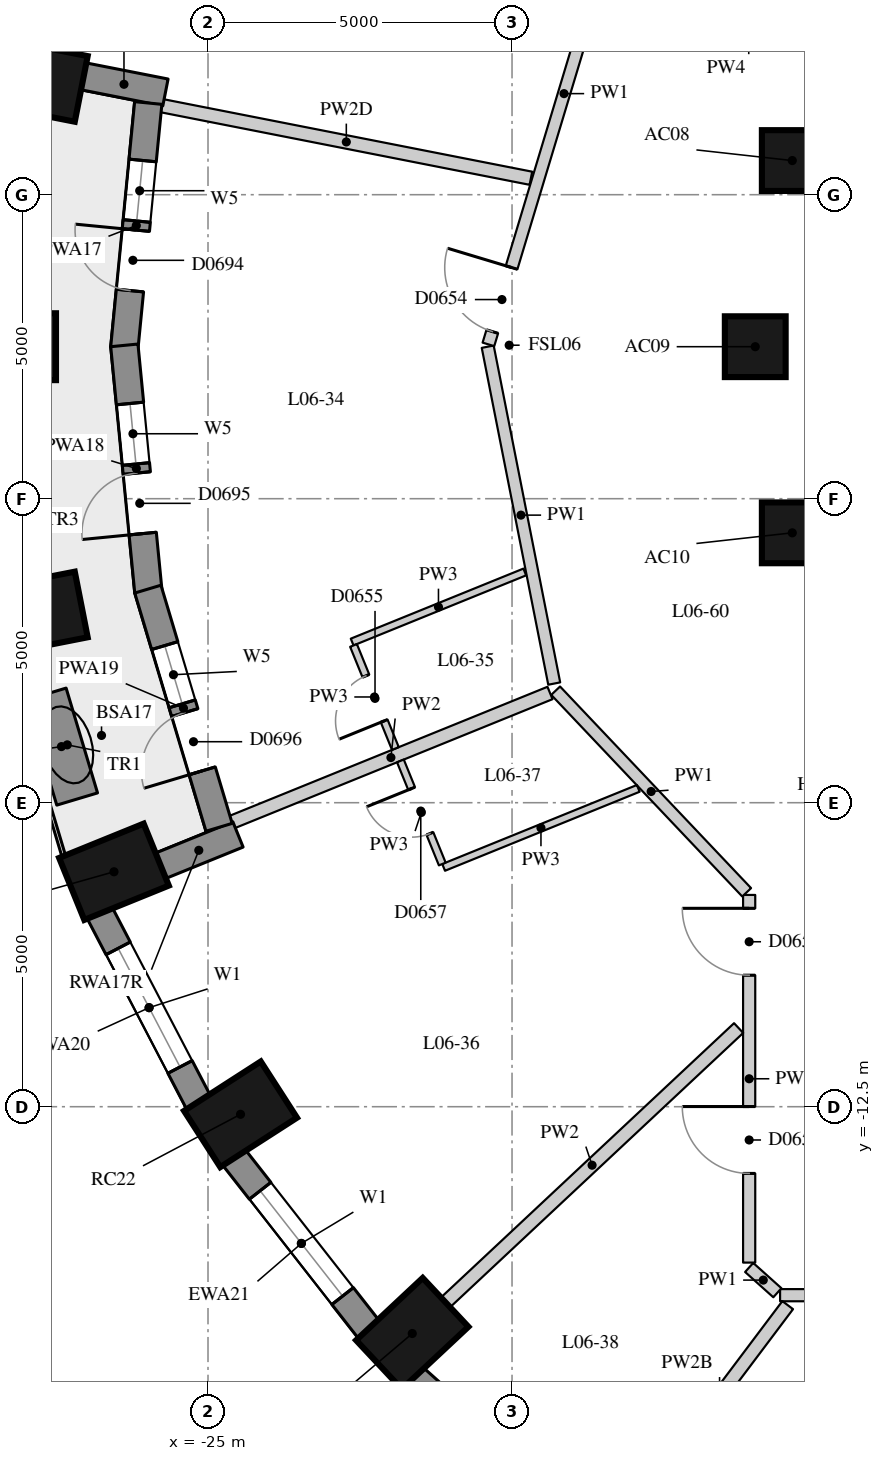
"""IFC4 building model, lengths in metres.
Left out: names, types, materials, properties, quantities, classifications, styles, units other than length and angle.
Written with IfcOpenShell. Run it as: python <this file> out.ifc"""

import sys

from ifc_helpers import new_model, si_unit, direction, frame, frame_2d, origin, origin_2d, place, context, subcontext, project, spatial, rectangle, extrude, element, fill, save


model = new_model("IFC4")
c1 = context("Model", 3, precision=1e-05, world=origin(), true_north=direction((0.0, 1.0)))
c2 = subcontext(c1, "Body", "Model", "MODEL_VIEW")
j1 = project(units=[si_unit("LENGTHUNIT", "METRE"), si_unit("PLANEANGLEUNIT", "RADIAN")], contexts=[c1])
p1 = place(None, origin())
s1 = spatial("IfcSite", under=j1, at=p1, CompositionType="ELEMENT")
p2 = place(p1, origin())
s2 = spatial("IfcBuilding", under=s1, at=p2, CompositionType="ELEMENT")
p3 = place(p2, frame((0.0, 0.0, 28.3)))
s3 = spatial("IfcBuildingStorey", under=s2, at=p3, CompositionType="ELEMENT", Elevation=28.3)
for number, where, z_axis, x_axis in (
    (1, (-27.821, 4.385, 0.0), (0.0, 0.0, 1.0), (-0.981, 0.193, 0.0)),
    (2, (-28.25, 0.0, 0.0), (0.0, 0.0, 1.0), (-1.0, 0.0, 0.0)),
    (3, (-27.821, -4.385, 0.0), (0.0, 0.0, 1.0), (-0.981, -0.193, 0.0)),
    (4, (-26.546, -8.636, 0.0), (0.0, 0.0, 1.0), (-0.927, -0.376, 0.0)),
    (5, (-24.465, -12.625, 0.0), (0.0, 0.0, 1.0), (-0.841, -0.541, 0.0)),
    (6, (-21.641, -16.23, 0.0), (0.0, 0.0, 1.0), (-0.73, -0.683, 0.0)),
):
    element("IfcColumn", number, at=place(p3, frame(where, z_axis=z_axis, x_axis=x_axis)), inside=s3, PredefinedType="COLUMN", context=c2, shape_type="SweptSolid", body=[
        extrude(rectangle(XDim=1.5, YDim=1.1, at=origin_2d()), origin(), (0.0, 0.0, 1.0), 3.3),
    ])
for number, where, z_axis, x_axis in (
    (7, (-15.391, 3.062, 0.0), (0.0, 0.0, 1.0), (1.0, 0.0, 0.0)),
    (8, (-16.0, 0.0, 0.0), (0.0, 0.0, 1.0), (1.0, 0.0, 0.0)),
    (9, (-15.391, -3.062, 0.0), (0.0, 0.0, 1.0), (1.0, 0.0, 0.0)),
):
    element("IfcColumn", number, at=place(p3, frame(where, z_axis=z_axis, x_axis=x_axis)), inside=s3, PredefinedType="COLUMN", context=c2, shape_type="SweptSolid", body=[
        extrude(rectangle(XDim=1.0, YDim=1.0, at=origin_2d()), origin(), (0.0, 0.0, 1.0), 3.3),
    ])
p4 = place(p3, frame((-26.786, -9.305, 0.0), z_axis=(0.0, 0.0, 1.0), x_axis=(0.462492775226, -0.886623050041, 0.0)))
e10 = element("IfcWall", 10, at=p4, inside=s3, PredefinedType="SOLIDWALL", context=c2, shape_type="SweptSolid", body=[
    extrude(rectangle(XDim=3.532, YDim=0.45, at=frame_2d((1.766, 0.0))), origin(), (0.0, 0.0, 1.0), 3.02),
])
p5 = place(p4, frame((0.666, 0.0, 0.4)))
e11 = element("IfcOpeningElement", 11, at=p5, cuts=e10, PredefinedType="OPENING", context=c2, shape_type="SweptSolid", body=[
    extrude(rectangle(XDim=2.2, YDim=1.75, at=frame_2d((1.1, 0.875))), frame((0.0, 0.235, 0.0), z_axis=(0.0, -1.0, 0.0), x_axis=(1.0, 0.0, 0.0)), (0.0, 0.0, 1.0), 0.47),
])
p6 = place(p3, frame((-24.578, -13.328, 0.0), z_axis=(0.0, 0.0, 1.0), x_axis=(0.616661975264, -0.787228053529, 0.0)))
e12 = element("IfcWall", 12, at=p6, inside=s3, PredefinedType="SOLIDWALL", context=c2, shape_type="SweptSolid", body=[
    extrude(rectangle(XDim=3.61, YDim=0.45, at=frame_2d((1.805, 0.0))), origin(), (0.0, 0.0, 1.0), 3.02),
])
p7 = place(p6, frame((0.705, 0.0, 0.4)))
e13 = element("IfcOpeningElement", 13, at=p7, cuts=e12, PredefinedType="OPENING", context=c2, shape_type="SweptSolid", body=[
    extrude(rectangle(XDim=2.2, YDim=1.75, at=frame_2d((1.1, 0.875))), frame((0.0, 0.235, 0.0), z_axis=(0.0, -1.0, 0.0), x_axis=(1.0, 0.0, 0.0)), (0.0, 0.0, 1.0), 0.47),
])
p8 = place(p3, frame((-21.627, -16.943, 0.0), z_axis=(0.0, 0.0, 1.0), x_axis=(0.745526233716, -0.66647628228, 0.0)))
e14 = element("IfcWall", 14, at=p8, inside=s3, PredefinedType="SOLIDWALL", context=c2, shape_type="SweptSolid", body=[
    extrude(rectangle(XDim=3.697, YDim=0.45, at=frame_2d((1.848, 0.0))), origin(), (0.0, 0.0, 1.0), 3.02),
])
p9 = place(p8, frame((0.749, 0.0, 0.4)))
e15 = element("IfcOpeningElement", 15, at=p9, cuts=e14, PredefinedType="OPENING", context=c2, shape_type="SweptSolid", body=[
    extrude(rectangle(XDim=2.2, YDim=1.75, at=frame_2d((1.1, 0.875))), frame((0.0, 0.235, 0.0), z_axis=(0.0, -1.0, 0.0), x_axis=(1.0, 0.0, 0.0)), (0.0, 0.0, 1.0), 0.47),
])
p10 = place(p3, frame((-27.064, 4.45, 0.0), z_axis=(0.0, 0.0, 1.0), x_axis=(0.98123042829, -0.192838913596, 0.0)))
e16 = element("IfcWall", 16, at=p10, inside=s3, PredefinedType="SOLIDWALL", context=c2, shape_type="SweptSolid", body=[
    extrude(rectangle(XDim=1.39, YDim=0.45, at=frame_2d((0.695, 0.0))), origin(), (0.0, 0.0, 1.0), 2.47),
])
p11 = place(p3, frame((-25.796, -8.544, 0.0), z_axis=(0.0, 0.0, 1.0), x_axis=(0.926575599743, 0.376108572039, 0.0)))
e17 = element("IfcWall", 17, at=p11, inside=s3, PredefinedType="SOLIDWALL", context=c2, shape_type="SweptSolid", body=[
    extrude(rectangle(XDim=1.39, YDim=0.45, at=frame_2d((0.695, 0.0))), origin(), (0.0, 0.0, 1.0), 3.02),
])
p12 = place(p3, frame((-25.983, 4.008, 0.0), z_axis=(0.0, 0.0, 1.0), x_axis=(-0.097133468736, -0.995271364629, 0.0)))
e18 = element("IfcWall", 18, at=p12, inside=s3, PredefinedType="SOLIDWALL", context=c2, shape_type="SweptSolid", body=[
    extrude(rectangle(XDim=4.049, YDim=0.45, at=frame_2d((2.024, 0.0))), origin(), (0.0, 0.0, 1.0), 3.02),
])
p13 = place(p12, frame((0.949, 0.0, 0.4)))
e19 = element("IfcOpeningElement", 19, at=p13, cuts=e18, PredefinedType="OPENING", context=c2, shape_type="SweptSolid", body=[
    extrude(rectangle(XDim=1.0, YDim=1.75, at=frame_2d((0.5, 0.875))), frame((0.0, 0.235, 0.0), z_axis=(0.0, -1.0, 0.0), x_axis=(1.0, 0.0, 0.0)), (0.0, 0.0, 1.0), 0.47),
])
p14 = place(p12, frame((2.1, 0.0, 0.0)))
e20 = element("IfcOpeningElement", 20, at=p14, cuts=e18, PredefinedType="OPENING", context=c2, shape_type="SweptSolid", body=[
    extrude(rectangle(XDim=1.0, YDim=2.15, at=frame_2d((0.5, 1.075))), frame((0.0, 0.235, 0.0), z_axis=(0.0, -1.0, 0.0), x_axis=(1.0, 0.0, 0.0)), (0.0, 0.0, 1.0), 0.47),
])
p15 = place(p3, frame((-26.376, 0.022, 0.0), z_axis=(0.0, 0.0, 1.0), x_axis=(0.097092719726, -0.995275340685, 0.0)))
e21 = element("IfcWall", 21, at=p15, inside=s3, PredefinedType="SOLIDWALL", context=c2, shape_type="SweptSolid", body=[
    extrude(rectangle(XDim=4.071, YDim=0.45, at=frame_2d((2.036, 0.0))), origin(), (0.0, 0.0, 1.0), 3.02),
])
p16 = place(p15, frame((0.96, 0.0, 0.4)))
e22 = element("IfcOpeningElement", 22, at=p16, cuts=e21, PredefinedType="OPENING", context=c2, shape_type="SweptSolid", body=[
    extrude(rectangle(XDim=1.0, YDim=1.75, at=frame_2d((0.5, 0.875))), frame((0.0, 0.235, 0.0), z_axis=(0.0, -1.0, 0.0), x_axis=(1.0, 0.0, 0.0)), (0.0, 0.0, 1.0), 0.47),
])
p17 = place(p15, frame((2.111, 0.0, 0.0)))
e23 = element("IfcOpeningElement", 23, at=p17, cuts=e21, PredefinedType="OPENING", context=c2, shape_type="SweptSolid", body=[
    extrude(rectangle(XDim=1.0, YDim=2.15, at=frame_2d((0.5, 1.075))), frame((0.0, 0.235, 0.0), z_axis=(0.0, -1.0, 0.0), x_axis=(1.0, 0.0, 0.0)), (0.0, 0.0, 1.0), 0.47),
])
p18 = place(p3, frame((-25.989, -3.987, 0.0), z_axis=(0.0, 0.0, 1.0), x_axis=(0.286427456555, -0.958101932015, 0.0)))
e24 = element("IfcWall", 24, at=p18, inside=s3, PredefinedType="SOLIDWALL", context=c2, shape_type="SweptSolid", body=[
    extrude(rectangle(XDim=4.089, YDim=0.45, at=frame_2d((2.044, 0.0))), origin(), (0.0, 0.0, 1.0), 3.02),
])
p19 = place(p18, frame((0.969, 0.0, 0.4)))
e25 = element("IfcOpeningElement", 25, at=p19, cuts=e24, PredefinedType="OPENING", context=c2, shape_type="SweptSolid", body=[
    extrude(rectangle(XDim=1.0, YDim=1.75, at=frame_2d((0.5, 0.875))), frame((0.0, 0.235, 0.0), z_axis=(0.0, -1.0, 0.0), x_axis=(1.0, 0.0, 0.0)), (0.0, 0.0, 1.0), 0.47),
])
p20 = place(p18, frame((2.119, 0.0, 0.0)))
e26 = element("IfcOpeningElement", 26, at=p20, cuts=e24, PredefinedType="OPENING", context=c2, shape_type="SweptSolid", body=[
    extrude(rectangle(XDim=1.0, YDim=2.15, at=frame_2d((0.5, 1.075))), frame((0.0, 0.235, 0.0), z_axis=(0.0, -1.0, 0.0), x_axis=(1.0, 0.0, 0.0)), (0.0, 0.0, 1.0), 0.47),
])
p21 = place(p3, frame((-27.669, -5.715, 0.0), z_axis=(0.0, 0.0, 1.0), x_axis=(0.287024312863, -0.957923297465, 0.0)))
e27 = element("IfcWall", 27, at=p21, inside=s3, PredefinedType="USERDEFINED", context=c2, shape_type="SweptSolid", body=[
    extrude(rectangle(XDim=1.8, YDim=0.7, at=frame_2d((0.9, 0.0))), origin(), (0.0, 0.0, 1.0), 0.75),
])
p22 = place(p3, frame((-7.92, -15.6, 0.0), z_axis=(0.0, 0.0, 1.0), x_axis=(-1.0, 0.0, 0.0)))
e28 = element("IfcWall", 28, at=p22, inside=s3, PredefinedType="PARTITIONING", context=c2, shape_type="SweptSolid", body=[
    extrude(rectangle(XDim=7.672, YDim=0.2, at=frame_2d((3.836, 0.0))), origin(), (0.0, 0.0, 1.0), 3.02),
])
p23 = place(p22, frame((5.537, 0.0, 0.0)))
e29 = element("IfcOpeningElement", 29, at=p23, cuts=e28, PredefinedType="OPENING", context=c2, shape_type="SweptSolid", body=[
    extrude(rectangle(XDim=1.0, YDim=2.1, at=frame_2d((0.5, 1.05))), frame((0.0, 0.11, 0.0), z_axis=(0.0, -1.0, 0.0), x_axis=(1.0, 0.0, 0.0)), (0.0, 0.0, 1.0), 0.22),
])
p24 = place(p22, frame((1.036, 0.0, 0.0)))
e30 = element("IfcOpeningElement", 30, at=p24, cuts=e28, PredefinedType="OPENING", context=c2, shape_type="SweptSolid", body=[
    extrude(rectangle(XDim=0.9, YDim=2.1, at=frame_2d((0.45, 1.05))), frame((0.0, 0.11, 0.0), z_axis=(0.0, -1.0, 0.0), x_axis=(1.0, 0.0, 0.0)), (0.0, 0.0, 1.0), 0.22),
])
p25 = place(p3, frame((-15.636, -15.56, 0.0), z_axis=(0.0, 0.0, 1.0), x_axis=(-0.744656758283, 0.667447610187, 0.0)))
e31 = element("IfcWall", 31, at=p25, inside=s3, PredefinedType="PARTITIONING", context=c2, shape_type="SweptSolid", body=[
    extrude(rectangle(XDim=0.623, YDim=0.2, at=frame_2d((0.312, 0.0))), origin(), (0.0, 0.0, 1.0), 3.02),
])
p26 = place(p3, frame((-16.1, -15.064, 0.0), z_axis=(0.0, 0.0, 1.0), x_axis=(0.0, 1.0, 0.0)))
e32 = element("IfcWall", 32, at=p26, inside=s3, PredefinedType="PARTITIONING", context=c2, shape_type="SweptSolid", body=[
    extrude(rectangle(XDim=6.047, YDim=0.2, at=frame_2d((3.023, 0.0))), origin(), (0.0, 0.0, 1.0), 3.02),
])
p27 = place(p26, frame((4.727, 0.0, 0.0)))
e33 = element("IfcOpeningElement", 33, at=p27, cuts=e32, PredefinedType="OPENING", context=c2, shape_type="SweptSolid", body=[
    extrude(rectangle(XDim=1.1, YDim=2.1, at=frame_2d((0.55, 1.05))), frame((0.0, 0.11, 0.0), z_axis=(0.0, -1.0, 0.0), x_axis=(1.0, 0.0, 0.0)), (0.0, 0.0, 1.0), 0.22),
])
p28 = place(p26, frame((1.467, 0.0, 0.0)))
e34 = element("IfcOpeningElement", 34, at=p28, cuts=e32, PredefinedType="OPENING", context=c2, shape_type="SweptSolid", body=[
    extrude(rectangle(XDim=1.1, YDim=2.1, at=frame_2d((0.55, 1.05))), frame((0.0, 0.11, 0.0), z_axis=(0.0, -1.0, 0.0), x_axis=(1.0, 0.0, 0.0)), (0.0, 0.0, 1.0), 0.22),
])
p29 = place(p3, frame((-16.141, -8.974, 0.0), z_axis=(0.0, 0.0, 1.0), x_axis=(-0.687741683024, 0.725955492735, 0.0)))
e35 = element("IfcWall", 35, at=p29, inside=s3, PredefinedType="PARTITIONING", context=c2, shape_type="SweptSolid", body=[
    extrude(rectangle(XDim=4.568, YDim=0.2, at=frame_2d((2.284, 0.0))), origin(), (0.0, 0.0, 1.0), 3.02),
])
p30 = place(p3, frame((-19.306, -5.541, 0.0), z_axis=(0.0, 0.0, 1.0), x_axis=(-0.193671356151, 0.981066463501, 0.0)))
e36 = element("IfcWall", 36, at=p30, inside=s3, PredefinedType="PARTITIONING", context=c2, shape_type="SweptSolid", body=[
    extrude(rectangle(XDim=5.647, YDim=0.2, at=frame_2d((2.824, 0.0))), origin(), (0.0, 0.0, 1.0), 3.02),
])
p31 = place(p3, frame((-20.388, 0.038, 0.0), z_axis=(0.0, 0.0, 1.0), x_axis=(0.288600779805, 0.957449523419, 0.0)))
e37 = element("IfcWall", 37, at=p31, inside=s3, PredefinedType="PARTITIONING", context=c2, shape_type="SweptSolid", body=[
    extrude(rectangle(XDim=8.615, YDim=0.2, at=frame_2d((4.308, 0.0))), origin(), (0.0, 0.0, 1.0), 3.02),
])
p32 = place(p31, frame((7.295, 0.0, 0.0)))
e38 = element("IfcOpeningElement", 38, at=p32, cuts=e37, PredefinedType="OPENING", context=c2, shape_type="SweptSolid", body=[
    extrude(rectangle(XDim=1.1, YDim=2.1, at=frame_2d((0.55, 1.05))), frame((0.0, 0.11, 0.0), z_axis=(0.0, -1.0, 0.0), x_axis=(1.0, 0.0, 0.0)), (0.0, 0.0, 1.0), 0.22),
])
p33 = place(p31, frame((0.22, 0.0, 0.0)))
e39 = element("IfcOpeningElement", 39, at=p33, cuts=e37, PredefinedType="OPENING", context=c2, shape_type="SweptSolid", body=[
    extrude(rectangle(XDim=1.1, YDim=2.1, at=frame_2d((0.55, 1.05))), frame((0.0, 0.11, 0.0), z_axis=(0.0, -1.0, 0.0), x_axis=(1.0, 0.0, 0.0)), (0.0, 0.0, 1.0), 0.22),
])
p34 = place(p3, frame((-25.761, 3.964, 0.0), z_axis=(0.0, 0.0, 1.0), x_axis=(0.981209888948, -0.192943395406, 0.0)))
e40 = element("IfcWall", 40, at=p34, inside=s3, PredefinedType="PARTITIONING", context=c2, shape_type="SweptSolid", body=[
    extrude(rectangle(XDim=6.188, YDim=0.22, at=frame_2d((3.094, 0.0))), origin(), (0.0, 0.0, 1.0), 2.47),
])
p35 = place(p3, frame((-24.608, -7.82, 0.0), z_axis=(0.0, 0.0, 1.0), x_axis=(0.926565467624, 0.376133532415, 0.0)))
e41 = element("IfcWall", 41, at=p35, inside=s3, PredefinedType="PARTITIONING", context=c2, shape_type="SweptSolid", body=[
    extrude(rectangle(XDim=5.648, YDim=0.22, at=frame_2d((2.824, 0.0))), origin(), (0.0, 0.0, 1.0), 3.02),
])
p36 = place(p3, frame((-21.093, -15.718, 0.0), z_axis=(0.0, 0.0, 1.0), x_axis=(0.73009284205, 0.683347965525, 0.0)))
e42 = element("IfcWall", 42, at=p36, inside=s3, PredefinedType="PARTITIONING", context=c2, shape_type="SweptSolid", body=[
    extrude(rectangle(XDim=6.602, YDim=0.22, at=frame_2d((3.301, 0.0))), origin(), (0.0, 0.0, 1.0), 3.02),
])
p37 = place(p3, frame((-17.708, -18.743, 0.0), z_axis=(0.0, 0.0, 1.0), x_axis=(0.601172757903, 0.799119086967, 0.0)))
e43 = element("IfcWall", 43, at=p37, inside=s3, PredefinedType="PARTITIONING", context=c2, shape_type="SweptSolid", body=[
    extrude(rectangle(XDim=3.729, YDim=0.22, at=frame_2d((1.864, 0.0))), origin(), (0.0, 0.0, 1.0), 2.57),
])
p38 = place(p3, frame((-19.79, -3.705, 0.0), z_axis=(0.0, 0.0, 1.0), x_axis=(-0.926585481443, -0.37608422671, 0.0)))
e44 = element("IfcWall", 44, at=p38, inside=s3, PredefinedType="PARTITIONING", context=c2, shape_type="SweptSolid", body=[
    extrude(rectangle(XDim=3.064, YDim=0.12, at=frame_2d((1.532, 0.0))), origin(), (0.0, 0.0, 1.0), 3.02),
])
p39 = place(p3, frame((-17.924, -7.264, 0.0), z_axis=(0.0, 0.0, 1.0), x_axis=(-0.926548953408, -0.376174210891, 0.0)))
e45 = element("IfcWall", 45, at=p39, inside=s3, PredefinedType="PARTITIONING", context=c2, shape_type="SweptSolid", body=[
    extrude(rectangle(XDim=3.455, YDim=0.12, at=frame_2d((1.727, 0.0))), origin(), (0.0, 0.0, 1.0), 3.02),
])
p40 = place(p3, frame((-22.607, -4.913, 0.0), z_axis=(0.0, 0.0, 1.0), x_axis=(0.376216010002, -0.92653198208, 0.0)))
e46 = element("IfcWall", 46, at=p40, inside=s3, PredefinedType="PARTITIONING", context=c2, shape_type="SweptSolid", body=[
    extrude(rectangle(XDim=1.83, YDim=0.12, at=frame_2d((0.915, 0.0))), origin(), (0.0, 0.0, 1.0), 3.02),
])
p41 = place(p40, frame((0.54, 0.0, 0.0)))
e47 = element("IfcOpeningElement", 47, at=p41, cuts=e46, PredefinedType="OPENING", context=c2, shape_type="SweptSolid", body=[
    extrude(rectangle(XDim=0.8, YDim=2.1, at=frame_2d((0.4, 1.05))), frame((0.0, 0.07, 0.0), z_axis=(0.0, -1.0, 0.0), x_axis=(1.0, 0.0, 0.0)), (0.0, 0.0, 1.0), 0.14),
])
p42 = place(p3, frame((-21.147, -8.508, 0.0), z_axis=(0.0, 0.0, 1.0), x_axis=(-0.376216010002, 0.92653198208, 0.0)))
e48 = element("IfcWall", 48, at=p42, inside=s3, PredefinedType="PARTITIONING", context=c2, shape_type="SweptSolid", body=[
    extrude(rectangle(XDim=1.83, YDim=0.12, at=frame_2d((0.915, 0.0))), origin(), (0.0, 0.0, 1.0), 3.02),
])
p43 = place(p42, frame((0.54, 0.0, 0.0)))
e49 = element("IfcOpeningElement", 49, at=p43, cuts=e48, PredefinedType="OPENING", context=c2, shape_type="SweptSolid", body=[
    extrude(rectangle(XDim=0.8, YDim=2.1, at=frame_2d((0.4, 1.05))), frame((0.0, 0.07, 0.0), z_axis=(0.0, -1.0, 0.0), x_axis=(1.0, 0.0, 0.0)), (0.0, 0.0, 1.0), 0.14),
])
p44 = place(p5, origin())
e50 = element("IfcWindow", 50, at=p44, inside=s3, PartitioningType="SINGLE_PANEL", PredefinedType="WINDOW", context=c2, shape_type="SweptSolid", body=[
    extrude(rectangle(XDim=2.2, YDim=1.75, at=frame_2d((1.1, 0.875))), frame((0.0, 0.035, 0.0), z_axis=(0.0, -1.0, 0.0), x_axis=(1.0, 0.0, 0.0)), (0.0, 0.0, 1.0), 0.06),
])
fill(e11, e50)
p45 = place(p7, origin())
e51 = element("IfcWindow", 51, at=p45, inside=s3, PartitioningType="SINGLE_PANEL", PredefinedType="WINDOW", context=c2, shape_type="SweptSolid", body=[
    extrude(rectangle(XDim=2.2, YDim=1.75, at=frame_2d((1.1, 0.875))), frame((0.0, 0.035, 0.0), z_axis=(0.0, -1.0, 0.0), x_axis=(1.0, 0.0, 0.0)), (0.0, 0.0, 1.0), 0.06),
])
fill(e13, e51)
p46 = place(p13, origin())
e52 = element("IfcWindow", 52, at=p46, inside=s3, PartitioningType="SINGLE_PANEL", PredefinedType="WINDOW", context=c2, shape_type="SweptSolid", body=[
    extrude(rectangle(XDim=1.0, YDim=1.75, at=frame_2d((0.5, 0.875))), frame((0.0, 0.035, 0.0), z_axis=(0.0, -1.0, 0.0), x_axis=(1.0, 0.0, 0.0)), (0.0, 0.0, 1.0), 0.06),
])
fill(e19, e52)
p47 = place(p14, frame((1.0, 0.0, 0.0), z_axis=(0.0, 0.0, 1.0), x_axis=(-1.0, 0.0, 0.0)))
e53 = element("IfcDoor", 53, at=p47, inside=s3, OperationType="SINGLE_SWING_RIGHT", PredefinedType="DOOR", context=c2, shape_type="SweptSolid", body=[
    extrude(rectangle(XDim=1.0, YDim=2.15, at=frame_2d((0.5, 1.075))), frame((0.0, 0.075, 0.0), z_axis=(0.0, -1.0, 0.0), x_axis=(1.0, 0.0, 0.0)), (0.0, 0.0, 1.0), 0.05),
])
fill(e20, e53)
p48 = place(p16, origin())
e54 = element("IfcWindow", 54, at=p48, inside=s3, PartitioningType="SINGLE_PANEL", PredefinedType="WINDOW", context=c2, shape_type="SweptSolid", body=[
    extrude(rectangle(XDim=1.0, YDim=1.75, at=frame_2d((0.5, 0.875))), frame((0.0, 0.035, 0.0), z_axis=(0.0, -1.0, 0.0), x_axis=(1.0, 0.0, 0.0)), (0.0, 0.0, 1.0), 0.06),
])
fill(e22, e54)
p49 = place(p17, frame((1.0, 0.0, 0.0), z_axis=(0.0, 0.0, 1.0), x_axis=(-1.0, 0.0, 0.0)))
e55 = element("IfcDoor", 55, at=p49, inside=s3, OperationType="SINGLE_SWING_LEFT", PredefinedType="DOOR", context=c2, shape_type="SweptSolid", body=[
    extrude(rectangle(XDim=1.0, YDim=2.15, at=frame_2d((0.5, 1.075))), frame((0.0, 0.075, 0.0), z_axis=(0.0, -1.0, 0.0), x_axis=(1.0, 0.0, 0.0)), (0.0, 0.0, 1.0), 0.05),
])
fill(e23, e55)
p50 = place(p19, origin())
e56 = element("IfcWindow", 56, at=p50, inside=s3, PartitioningType="SINGLE_PANEL", PredefinedType="WINDOW", context=c2, shape_type="SweptSolid", body=[
    extrude(rectangle(XDim=1.0, YDim=1.75, at=frame_2d((0.5, 0.875))), frame((0.0, 0.035, 0.0), z_axis=(0.0, -1.0, 0.0), x_axis=(1.0, 0.0, 0.0)), (0.0, 0.0, 1.0), 0.06),
])
fill(e25, e56)
p51 = place(p20, frame((1.0, 0.0, 0.0), z_axis=(0.0, 0.0, 1.0), x_axis=(-1.0, 0.0, 0.0)))
e57 = element("IfcDoor", 57, at=p51, inside=s3, OperationType="SINGLE_SWING_LEFT", PredefinedType="DOOR", context=c2, shape_type="SweptSolid", body=[
    extrude(rectangle(XDim=1.0, YDim=2.15, at=frame_2d((0.5, 1.075))), frame((0.0, 0.075, 0.0), z_axis=(0.0, -1.0, 0.0), x_axis=(1.0, 0.0, 0.0)), (0.0, 0.0, 1.0), 0.05),
])
fill(e26, e57)
p52 = place(p33, origin())
e58 = element("IfcDoor", 58, at=p52, inside=s3, OperationType="SINGLE_SWING_RIGHT", PredefinedType="DOOR", context=c2, shape_type="SweptSolid", body=[
    extrude(rectangle(XDim=1.1, YDim=2.1, at=frame_2d((0.55, 1.05))), frame((0.0, 0.025, 0.0), z_axis=(0.0, -1.0, 0.0), x_axis=(1.0, 0.0, 0.0)), (0.0, 0.0, 1.0), 0.05),
])
fill(e39, e58)
p53 = place(p41, origin())
e59 = element("IfcDoor", 59, at=p53, inside=s3, OperationType="SINGLE_SWING_LEFT", PredefinedType="DOOR", context=c2, shape_type="SweptSolid", body=[
    extrude(rectangle(XDim=0.8, YDim=2.1, at=frame_2d((0.4, 1.05))), frame((0.0, 0.025, 0.0), z_axis=(0.0, -1.0, 0.0), x_axis=(1.0, 0.0, 0.0)), (0.0, 0.0, 1.0), 0.05),
])
fill(e47, e59)
p54 = place(p27, origin())
e60 = element("IfcDoor", 60, at=p54, inside=s3, OperationType="SINGLE_SWING_RIGHT", PredefinedType="DOOR", context=c2, shape_type="SweptSolid", body=[
    extrude(rectangle(XDim=1.1, YDim=2.1, at=frame_2d((0.55, 1.05))), frame((0.0, 0.025, 0.0), z_axis=(0.0, -1.0, 0.0), x_axis=(1.0, 0.0, 0.0)), (0.0, 0.0, 1.0), 0.05),
])
fill(e33, e60)
p55 = place(p43, origin())
e61 = element("IfcDoor", 61, at=p55, inside=s3, OperationType="SINGLE_SWING_RIGHT", PredefinedType="DOOR", context=c2, shape_type="SweptSolid", body=[
    extrude(rectangle(XDim=0.8, YDim=2.1, at=frame_2d((0.4, 1.05))), frame((0.0, 0.025, 0.0), z_axis=(0.0, -1.0, 0.0), x_axis=(1.0, 0.0, 0.0)), (0.0, 0.0, 1.0), 0.05),
])
fill(e49, e61)
p56 = place(p28, origin())
e62 = element("IfcDoor", 62, at=p56, inside=s3, OperationType="SINGLE_SWING_RIGHT", PredefinedType="DOOR", context=c2, shape_type="SweptSolid", body=[
    extrude(rectangle(XDim=1.1, YDim=2.1, at=frame_2d((0.55, 1.05))), frame((0.0, 0.025, 0.0), z_axis=(0.0, -1.0, 0.0), x_axis=(1.0, 0.0, 0.0)), (0.0, 0.0, 1.0), 0.05),
])
fill(e34, e62)
save(model, sys.argv[1])
